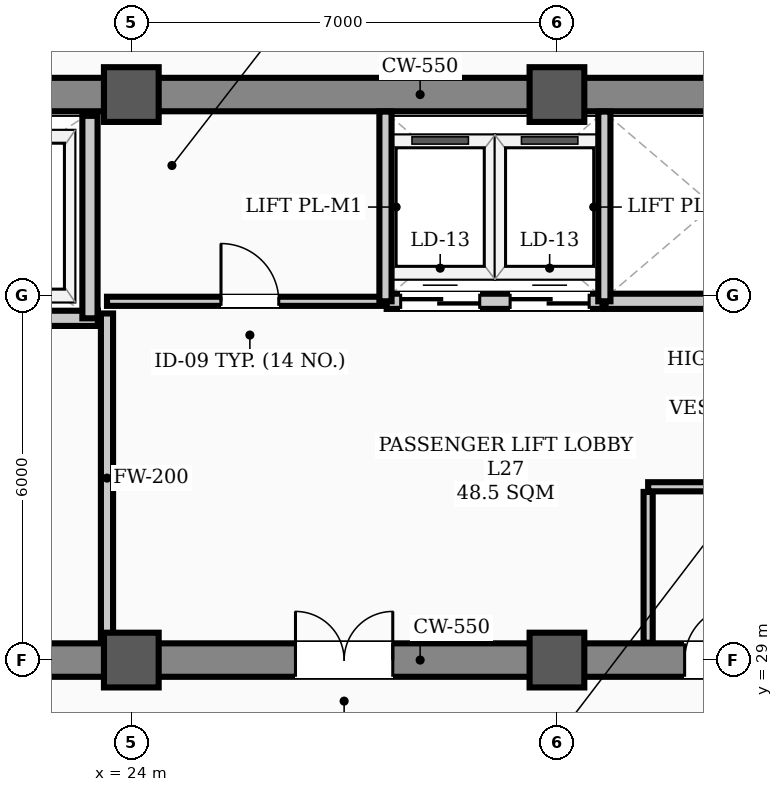
"""IFC4 building model, lengths in metres.
Left out: names, types, materials, properties, quantities, classifications, styles, units other than length and angle.
Written with IfcOpenShell. Run it as: python <this file> out.ifc"""

import sys

from ifc_helpers import new_model, si_unit, direction, frame, frame_2d, origin, origin_2d, place, context, subcontext, project, spatial, rectangle, hollow_rectangle, extrude, element, fill, save


model = new_model("IFC4")
c1 = context("Model", 3, precision=1e-05, world=origin(), true_north=direction((0.0, 1.0)))
c2 = subcontext(c1, "Body", "Model", "MODEL_VIEW")
j1 = project(units=[si_unit("LENGTHUNIT", "METRE"), si_unit("PLANEANGLEUNIT", "RADIAN")], contexts=[c1])
p1 = place(None, origin())
s1 = spatial("IfcSite", under=j1, at=p1, CompositionType="ELEMENT")
p2 = place(p1, origin())
s2 = spatial("IfcBuilding", under=s1, at=p2, CompositionType="ELEMENT")
p3 = place(p2, frame((0.0, 0.0, 111.0)))
s3 = spatial("IfcBuildingStorey", under=s2, at=p3, CompositionType="ELEMENT", Elevation=111.0)
for number, where, z_axis, x_axis in (
    (1, (24.0, 29.0, 0.0), (0.0, 0.0, 1.0), (1.0, 0.0, 0.0)),
    (2, (24.0, 38.3, 0.0), (0.0, 0.0, 1.0), (1.0, 0.0, 0.0)),
    (3, (31.0, 29.0, 0.0), (0.0, 0.0, 1.0), (1.0, 0.0, 0.0)),
    (4, (31.0, 38.3, 0.0), (0.0, 0.0, 1.0), (1.0, 0.0, 0.0)),
):
    element("IfcColumn", number, at=place(p3, frame(where, z_axis=z_axis, x_axis=x_axis)), inside=s3, PredefinedType="COLUMN", context=c2, shape_type="SweptSolid", body=[
        extrude(hollow_rectangle(XDim=0.9, YDim=0.9, WallThickness=0.035, InnerFilletRadius=0.017, OuterFilletRadius=0.052, at=origin_2d()), origin(), (0.0, 0.0, 1.0), 3.9),
    ])
p4 = place(p3, frame((13.5, 29.0, 0.0), z_axis=(0.0, 0.0, 1.0), x_axis=(1.0, 0.0, 0.0)))
e5 = element("IfcWall", 5, at=p4, inside=s3, PredefinedType="SHEAR", context=c2, shape_type="SweptSolid", body=[
    extrude(rectangle(XDim=30.5, YDim=0.55, at=frame_2d((15.25, 0.0))), origin(), (0.0, 0.0, 1.0), 3.66),
])
p5 = place(p4, frame((1.75, 0.0, 0.0)))
e6 = element("IfcOpeningElement", 6, at=p5, cuts=e5, PredefinedType="OPENING", context=c2, shape_type="SweptSolid", body=[
    extrude(rectangle(XDim=1.1, YDim=2.08, at=frame_2d((0.55, 1.04))), frame((0.0, 0.285, 0.0), z_axis=(0.0, -1.0, 0.0), x_axis=(1.0, 0.0, 0.0)), (0.0, 0.0, 1.0), 0.57),
])
p6 = place(p4, frame((26.7, 0.0, 0.0)))
e7 = element("IfcOpeningElement", 7, at=p6, cuts=e5, PredefinedType="OPENING", context=c2, shape_type="SweptSolid", body=[
    extrude(rectangle(XDim=1.1, YDim=2.08, at=frame_2d((0.55, 1.04))), frame((0.0, 0.285, 0.0), z_axis=(0.0, -1.0, 0.0), x_axis=(1.0, 0.0, 0.0)), (0.0, 0.0, 1.0), 0.57),
])
p7 = place(p4, frame((6.8, 0.0, 0.0)))
e8 = element("IfcOpeningElement", 8, at=p7, cuts=e5, PredefinedType="OPENING", context=c2, shape_type="SweptSolid", body=[
    extrude(rectangle(XDim=1.1, YDim=2.08, at=frame_2d((0.55, 1.04))), frame((0.0, 0.285, 0.0), z_axis=(0.0, -1.0, 0.0), x_axis=(1.0, 0.0, 0.0)), (0.0, 0.0, 1.0), 0.57),
])
p8 = place(p4, frame((13.2, 0.0, 0.0)))
e9 = element("IfcOpeningElement", 9, at=p8, cuts=e5, PredefinedType="OPENING", context=c2, shape_type="SweptSolid", body=[
    extrude(rectangle(XDim=1.6, YDim=2.08, at=frame_2d((0.8, 1.04))), frame((0.0, 0.285, 0.0), z_axis=(0.0, -1.0, 0.0), x_axis=(1.0, 0.0, 0.0)), (0.0, 0.0, 1.0), 0.57),
])
p9 = place(p4, frame((19.6, 0.0, 0.0)))
e10 = element("IfcOpeningElement", 10, at=p9, cuts=e5, PredefinedType="OPENING", context=c2, shape_type="SweptSolid", body=[
    extrude(rectangle(XDim=0.9, YDim=2.08, at=frame_2d((0.45, 1.04))), frame((0.0, 0.285, 0.0), z_axis=(0.0, -1.0, 0.0), x_axis=(1.0, 0.0, 0.0)), (0.0, 0.0, 1.0), 0.57),
])
p10 = place(p4, frame((21.6, 0.0, 0.0)))
e11 = element("IfcOpeningElement", 11, at=p10, cuts=e5, PredefinedType="OPENING", context=c2, shape_type="SweptSolid", body=[
    extrude(rectangle(XDim=0.9, YDim=2.08, at=frame_2d((0.45, 1.04))), frame((0.0, 0.285, 0.0), z_axis=(0.0, -1.0, 0.0), x_axis=(1.0, 0.0, 0.0)), (0.0, 0.0, 1.0), 0.57),
])
p11 = place(p3, frame((13.5, 38.3, 0.0), z_axis=(0.0, 0.0, 1.0), x_axis=(1.0, 0.0, 0.0)))
e12 = element("IfcWall", 12, at=p11, inside=s3, PredefinedType="SHEAR", context=c2, shape_type="SweptSolid", body=[
    extrude(rectangle(XDim=30.5, YDim=0.55, at=frame_2d((15.25, 0.0))), origin(), (0.0, 0.0, 1.0), 3.66),
])
p12 = place(p3, frame((18.1, 34.62, 0.0), z_axis=(0.0, 0.0, 1.0), x_axis=(1.0, 0.0, 0.0)))
e13 = element("IfcWall", 13, at=p12, inside=s3, PredefinedType="STANDARD", context=c2, shape_type="SweptSolid", body=[
    extrude(rectangle(XDim=5.35, YDim=0.25, at=frame_2d((2.675, 0.0))), origin(), (0.0, 0.0, 1.0), 3.66),
])
p13 = place(p12, frame((0.85, 0.0, 0.0)))
e14 = element("IfcOpeningElement", 14, at=p13, cuts=e13, PredefinedType="OPENING", context=c2, shape_type="SweptSolid", body=[
    extrude(rectangle(XDim=1.1, YDim=2.08, at=frame_2d((0.55, 1.04))), frame((0.0, 0.135, 0.0), z_axis=(0.0, -1.0, 0.0), x_axis=(1.0, 0.0, 0.0)), (0.0, 0.0, 1.0), 0.27),
])
p14 = place(p12, frame((3.45, 0.0, 0.0)))
e15 = element("IfcOpeningElement", 15, at=p14, cuts=e13, PredefinedType="OPENING", context=c2, shape_type="SweptSolid", body=[
    extrude(rectangle(XDim=1.1, YDim=2.08, at=frame_2d((0.55, 1.04))), frame((0.0, 0.135, 0.0), z_axis=(0.0, -1.0, 0.0), x_axis=(1.0, 0.0, 0.0)), (0.0, 0.0, 1.0), 0.27),
])
p15 = place(p3, frame((23.32, 34.62, 0.0), z_axis=(0.0, 0.0, 1.0), x_axis=(0.0, 1.0, 0.0)))
e16 = element("IfcWall", 16, at=p15, inside=s3, PredefinedType="STANDARD", context=c2, shape_type="SweptSolid", body=[
    extrude(rectangle(XDim=3.33, YDim=0.25, at=frame_2d((1.665, 0.0))), origin(), (0.0, 0.0, 1.0), 2.24),
])
p16 = place(p3, frame((28.2, 34.9, 0.0), z_axis=(0.0, 0.0, 1.0), x_axis=(1.0, 0.0, 0.0)))
e17 = element("IfcWall", 17, at=p16, inside=s3, PredefinedType="STANDARD", context=c2, shape_type="SweptSolid", body=[
    extrude(rectangle(XDim=3.55, YDim=0.25, at=frame_2d((1.775, 0.0))), origin(), (0.0, 0.0, 1.0), 3.66),
])
p17 = place(p16, frame((0.23, 0.0, 0.0)))
e18 = element("IfcOpeningElement", 18, at=p17, cuts=e17, PredefinedType="OPENING", context=c2, shape_type="SweptSolid", body=[
    extrude(rectangle(XDim=1.3, YDim=2.08, at=frame_2d((0.65, 1.04))), frame((0.0, 0.135, 0.0), z_axis=(0.0, -1.0, 0.0), x_axis=(1.0, 0.0, 0.0)), (0.0, 0.0, 1.0), 0.27),
])
p18 = place(p16, frame((2.03, 0.0, 0.0)))
e19 = element("IfcOpeningElement", 19, at=p18, cuts=e17, PredefinedType="OPENING", context=c2, shape_type="SweptSolid", body=[
    extrude(rectangle(XDim=1.3, YDim=2.08, at=frame_2d((0.65, 1.04))), frame((0.0, 0.135, 0.0), z_axis=(0.0, -1.0, 0.0), x_axis=(1.0, 0.0, 0.0)), (0.0, 0.0, 1.0), 0.27),
])
p19 = place(p3, frame((31.8, 34.9, 0.0), z_axis=(0.0, 0.0, 1.0), x_axis=(1.0, 0.0, 0.0)))
e20 = element("IfcWall", 20, at=p19, inside=s3, PredefinedType="STANDARD", context=c2, shape_type="SweptSolid", body=[
    extrude(rectangle(XDim=3.6, YDim=0.25, at=frame_2d((1.8, 0.0))), origin(), (0.0, 0.0, 1.0), 3.66),
])
p20 = place(p3, frame((23.6, 34.9, 0.0), z_axis=(0.0, 0.0, 1.0), x_axis=(1.0, 0.0, 0.0)))
e21 = element("IfcWall", 21, at=p20, inside=s3, PredefinedType="PARTITIONING", context=c2, shape_type="SweptSolid", body=[
    extrude(rectangle(XDim=4.58, YDim=0.15, at=frame_2d((2.29, 0.0))), origin(), (0.0, 0.0, 1.0), 3.66),
])
p21 = place(p20, frame((1.875, 0.0, 0.0)))
e22 = element("IfcOpeningElement", 22, at=p21, cuts=e21, PredefinedType="OPENING", context=c2, shape_type="SweptSolid", body=[
    extrude(rectangle(XDim=0.95, YDim=2.08, at=frame_2d((0.475, 1.04))), frame((0.0, 0.085, 0.0), z_axis=(0.0, -1.0, 0.0), x_axis=(1.0, 0.0, 0.0)), (0.0, 0.0, 1.0), 0.17),
])
p22 = place(p3, frame((32.5, 31.85, 0.0), z_axis=(0.0, 0.0, 1.0), x_axis=(1.0, 0.0, 0.0)))
e23 = element("IfcWall", 23, at=p22, inside=s3, PredefinedType="PARTITIONING", context=c2, shape_type="SweptSolid", body=[
    extrude(rectangle(XDim=4.1, YDim=0.15, at=frame_2d((2.05, 0.0))), origin(), (0.0, 0.0, 1.0), 3.66),
])
p23 = place(p3, frame((23.6, 29.285, 0.0), z_axis=(0.0, 0.0, 1.0), x_axis=(0.0, 1.0, 0.0)))
e24 = element("IfcWall", 24, at=p23, inside=s3, PredefinedType="STANDARD", context=c2, shape_type="SweptSolid", body=[
    extrude(rectangle(XDim=5.415, YDim=0.2, at=frame_2d((2.708, 0.0))), origin(), (0.0, 0.0, 1.0), 2.24),
])
p24 = place(p3, frame((32.5, 29.285, 0.0), z_axis=(0.0, 0.0, 1.0), x_axis=(0.0, 1.0, 0.0)))
e25 = element("IfcWall", 25, at=p24, inside=s3, PredefinedType="PARTITIONING", context=c2, shape_type="SweptSolid", body=[
    extrude(rectangle(XDim=2.48, YDim=0.15, at=frame_2d((1.24, 0.0))), origin(), (0.0, 0.0, 1.0), 2.24),
])
for number, where, z_axis, x_axis in (
    (26, (28.18, 34.9, 0.0), (0.0, 0.0, 1.0), (0.0, 1.0, 0.0)),
    (27, (31.78, 34.9, 0.0), (0.0, 0.0, 1.0), (0.0, 1.0, 0.0)),
):
    element("IfcWall", number, at=place(p3, frame(where, z_axis=z_axis, x_axis=x_axis)), inside=s3, PredefinedType="STANDARD", context=c2, shape_type="SweptSolid", body=[
        extrude(rectangle(XDim=3.12, YDim=0.2, at=frame_2d((1.56, 0.0))), origin(), (0.0, 0.0, 1.0), 2.24),
    ])
p25 = place(p8, origin())
e28 = element("IfcDoor", 28, at=p25, inside=s3, OperationType="DOUBLE_DOOR_SINGLE_SWING", PredefinedType="DOOR", context=c2, shape_type="SweptSolid", body=[
    extrude(rectangle(XDim=1.6, YDim=2.08, at=frame_2d((0.8, 1.04))), frame((0.0, 0.025, 0.0), z_axis=(0.0, -1.0, 0.0), x_axis=(1.0, 0.0, 0.0)), (0.0, 0.0, 1.0), 0.05),
])
fill(e9, e28)
p26 = place(p21, origin())
e29 = element("IfcDoor", 29, at=p26, inside=s3, OperationType="SINGLE_SWING_LEFT", PredefinedType="DOOR", context=c2, shape_type="SweptSolid", body=[
    extrude(rectangle(XDim=0.95, YDim=2.08, at=frame_2d((0.475, 1.04))), frame((0.0, 0.025, 0.0), z_axis=(0.0, -1.0, 0.0), x_axis=(1.0, 0.0, 0.0)), (0.0, 0.0, 1.0), 0.05),
])
fill(e22, e29)
p27 = place(p9, origin())
e30 = element("IfcDoor", 30, at=p27, inside=s3, OperationType="SINGLE_SWING_RIGHT", PredefinedType="DOOR", context=c2, shape_type="SweptSolid", body=[
    extrude(rectangle(XDim=0.9, YDim=2.08, at=frame_2d((0.45, 1.04))), frame((0.0, 0.025, 0.0), z_axis=(0.0, -1.0, 0.0), x_axis=(1.0, 0.0, 0.0)), (0.0, 0.0, 1.0), 0.05),
])
fill(e10, e30)
p28 = place(p17, origin())
e31 = element("IfcDoor", 31, at=p28, inside=s3, OperationType="DOUBLE_DOOR_SLIDING", PredefinedType="DOOR", context=c2, shape_type="SweptSolid", body=[
    extrude(rectangle(XDim=1.3, YDim=2.08, at=frame_2d((0.65, 1.04))), frame((0.0, 0.025, 0.0), z_axis=(0.0, -1.0, 0.0), x_axis=(1.0, 0.0, 0.0)), (0.0, 0.0, 1.0), 0.05),
])
fill(e18, e31)
p29 = place(p18, origin())
e32 = element("IfcDoor", 32, at=p29, inside=s3, OperationType="DOUBLE_DOOR_SLIDING", PredefinedType="DOOR", context=c2, shape_type="SweptSolid", body=[
    extrude(rectangle(XDim=1.3, YDim=2.08, at=frame_2d((0.65, 1.04))), frame((0.0, 0.025, 0.0), z_axis=(0.0, -1.0, 0.0), x_axis=(1.0, 0.0, 0.0)), (0.0, 0.0, 1.0), 0.05),
])
fill(e19, e32)
save(model, sys.argv[1])
